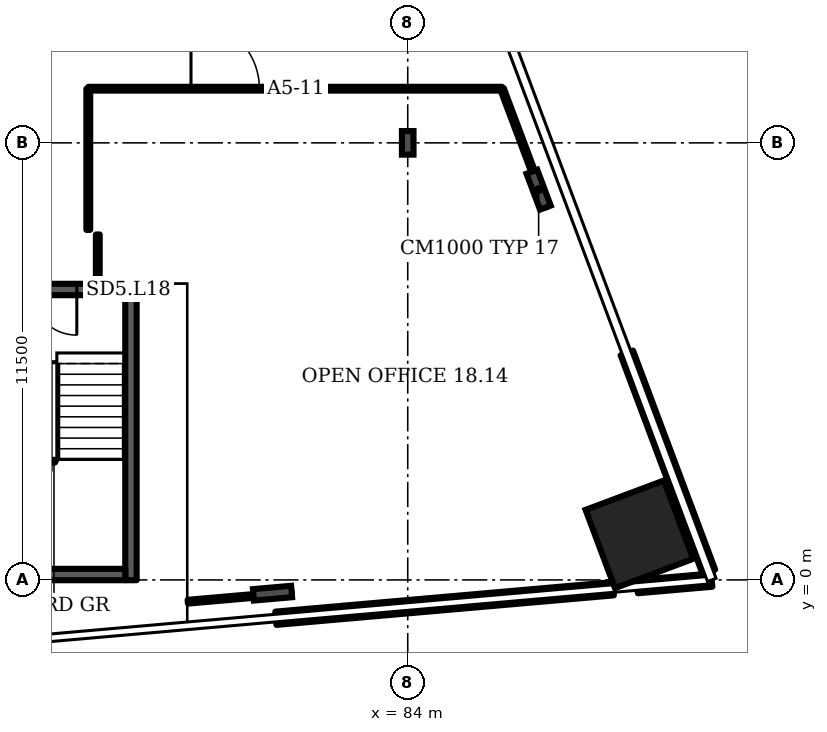
"""IFC4 building model, lengths in metres.
Left out: names, types, materials, properties, quantities, classifications, styles, units other than length and angle.
Written with IfcOpenShell. Run it as: python <this file> out.ifc"""

import sys

from ifc_helpers import new_model, si_unit, direction, frame, frame_2d, origin, origin_2d, place, context, subcontext, project, spatial, rectangle, i_section, extrude, element, fill, save


model = new_model("IFC4")
c1 = context("Model", 3, precision=1e-05, world=origin(), true_north=direction((0.0, 1.0)))
c2 = subcontext(c1, "Body", "Model", "MODEL_VIEW")
j1 = project(units=[si_unit("LENGTHUNIT", "METRE"), si_unit("PLANEANGLEUNIT", "RADIAN")], contexts=[c1])
p1 = place(None, origin())
s1 = spatial("IfcSite", under=j1, at=p1, CompositionType="ELEMENT")
p2 = place(p1, origin())
s2 = spatial("IfcBuilding", under=s1, at=p2, CompositionType="ELEMENT")
p3 = place(p2, frame((0.0, 0.0, 84.7)))
s3 = spatial("IfcBuildingStorey", under=s2, at=p3, CompositionType="ELEMENT", Elevation=84.7)
p4 = place(p3, frame((90.096, 1.2, 0.0), z_axis=(0.0, 0.0, 1.0), x_axis=(-0.351123, 0.936328, 0.0)))
e1 = element("IfcColumn", 1, at=p4, inside=s3, PredefinedType="COLUMN", context=c2, shape_type="SweptSolid", body=[
    extrude(rectangle(XDim=2.2, YDim=2.2, at=origin_2d()), origin(), (0.0, 0.0, 1.0), 3.6),
])
for number, where, z_axis, x_axis in (
    (2, (80.442, -0.349, 0.0), (0.0, 0.0, 1.0), (0.087, -0.996, 0.0)),
    (3, (87.445, 10.268, 0.0), (0.0, 0.0, 1.0), (0.936, 0.351, 0.0)),
):
    element("IfcColumn", number, at=place(p3, frame(where, z_axis=z_axis, x_axis=x_axis)), inside=s3, PredefinedType="COLUMN", context=c2, shape_type="SweptSolid", body=[
        extrude(i_section(OverallWidth=0.302, OverallDepth=1.008, WebThickness=0.021, FlangeThickness=0.04, FilletRadius=0.03, at=origin_2d()), origin(), (0.0, 0.0, 1.0), 3.6),
    ])
p5 = place(p3, frame((84.0, 11.5, 0.0), z_axis=(0.0, 0.0, 1.0), x_axis=(1.0, 0.0, 0.0)))
e4 = element("IfcColumn", 4, at=p5, inside=s3, PredefinedType="COLUMN", context=c2, shape_type="SweptSolid", body=[
    extrude(i_section(OverallWidth=0.305, OverallDepth=0.62, WebThickness=0.021, FlangeThickness=0.04, FilletRadius=0.027, at=origin_2d()), origin(), (0.0, 0.0, 1.0), 3.6),
])
p6 = place(p3, frame((80.53, -1.009, 0.0), z_axis=(0.0, 0.0, 1.0), x_axis=(0.996198, 0.087169, 0.0)))
e5 = element("IfcWall", 5, at=p6, inside=s3, PredefinedType="SOLIDWALL", context=c2, shape_type="SweptSolid", body=[
    extrude(rectangle(XDim=8.912, YDim=0.35, at=frame_2d((4.456, 0.0))), origin(), (0.0, 0.0, 1.0), 1.0),
])
p7 = place(p3, frame((90.039, -0.177, 0.0), z_axis=(0.0, 0.0, 1.0), x_axis=(0.996193, 0.08717, 0.0)))
e6 = element("IfcWall", 6, at=p7, inside=s3, PredefinedType="SOLIDWALL", context=c2, shape_type="SweptSolid", body=[
    extrude(rectangle(XDim=1.969, YDim=0.35, at=frame_2d((0.984, 0.0))), origin(), (0.0, 0.0, 1.0), 1.0),
])
p8 = place(p3, frame((91.926, 0.211, 0.0), z_axis=(0.0, 0.0, 1.0), x_axis=(-0.351118, 0.936328, 0.0)))
e7 = element("IfcWall", 7, at=p8, inside=s3, PredefinedType="SOLIDWALL", context=c2, shape_type="SweptSolid", body=[
    extrude(rectangle(XDim=6.154, YDim=0.35, at=frame_2d((3.077, 0.0))), origin(), (0.0, 0.0, 1.0), 1.0),
])
p9 = place(p3, frame((72.518, 7.642, 0.0), z_axis=(0.0, 0.0, 1.0), x_axis=(1.0, 0.0, 0.0)))
e8 = element("IfcWall", 8, at=p9, inside=s3, PredefinedType="SHEAR", context=c2, shape_type="SweptSolid", body=[
    extrude(rectangle(XDim=4.35, YDim=0.3, at=frame_2d((2.175, 0.0))), origin(), (0.0, 0.0, 1.0), 3.2),
])
p10 = place(p9, frame((1.575, 0.0, 0.0)))
e9 = element("IfcOpeningElement", 9, at=p10, cuts=e8, PredefinedType="OPENING", context=c2, shape_type="SweptSolid", body=[
    extrude(rectangle(XDim=1.2, YDim=2.1, at=frame_2d((0.6, 1.05))), frame((0.0, 0.16, 0.0), z_axis=(0.0, -1.0, 0.0), x_axis=(1.0, 0.0, 0.0)), (0.0, 0.0, 1.0), 0.32),
])
p11 = place(p3, frame((75.595, 9.21, 0.0), z_axis=(0.0, 0.0, 1.0), x_axis=(0.0, 1.0, 0.0)))
e10 = element("IfcWall", 10, at=p11, inside=s3, PredefinedType="PARTITIONING", context=c2, shape_type="SweptSolid", body=[
    extrude(rectangle(XDim=3.715, YDim=0.1, at=frame_2d((1.857, 0.0))), origin(), (0.0, 0.0, 1.0), 3.2),
])
p12 = place(p3, frame((75.595, 12.925, 0.0), z_axis=(0.0, 0.0, 1.0), x_axis=(1.0, 0.0, 0.0)))
e11 = element("IfcWall", 11, at=p12, inside=s3, PredefinedType="PARTITIONING", context=c2, shape_type="SweptSolid", body=[
    extrude(rectangle(XDim=10.885, YDim=0.1, at=frame_2d((5.442, 0.0))), origin(), (0.0, 0.0, 1.0), 3.2),
])
p13 = place(p12, frame((2.702, 0.0, 0.0)))
e12 = element("IfcOpeningElement", 12, at=p13, cuts=e11, PredefinedType="OPENING", context=c2, shape_type="SweptSolid", body=[
    extrude(rectangle(XDim=1.8, YDim=2.1, at=frame_2d((0.9, 1.05))), frame((0.0, 0.06, 0.0), z_axis=(0.0, -1.0, 0.0), x_axis=(1.0, 0.0, 0.0)), (0.0, 0.0, 1.0), 0.12),
])
p14 = place(p3, frame((75.845, 7.812, 0.0), z_axis=(0.0, 0.0, 1.0), x_axis=(0.0, 1.0, 0.0)))
e13 = element("IfcWall", 13, at=p14, inside=s3, PredefinedType="PARTITIONING", context=c2, shape_type="SweptSolid", body=[
    extrude(rectangle(XDim=1.278, YDim=0.1, at=frame_2d((0.639, 0.0))), origin(), (0.0, 0.0, 1.0), 3.2),
])
p15 = place(p3, frame((78.212, -0.573, 0.0), z_axis=(0.0, 0.0, 1.0), x_axis=(0.996224, 0.086779, 0.0)))
e14 = element("IfcWall", 14, at=p15, inside=s3, PredefinedType="PARTITIONING", context=c2, shape_type="SweptSolid", body=[
    extrude(rectangle(XDim=2.743, YDim=0.1, at=frame_2d((1.372, 0.0))), origin(), (0.0, 0.0, 1.0), 2.58),
])
p16 = place(p3, frame((87.65, 9.81, 0.0), z_axis=(0.0, 0.0, 1.0), x_axis=(-0.351597, 0.936149, 0.0)))
e15 = element("IfcWall", 15, at=p16, inside=s3, PredefinedType="PARTITIONING", context=c2, shape_type="SweptSolid", body=[
    extrude(rectangle(XDim=3.327, YDim=0.1, at=frame_2d((1.664, 0.0))), origin(), (0.0, 0.0, 1.0), 2.58),
])
p17 = place(p3, frame((76.718, -0.008, 0.0), z_axis=(0.0, 0.0, 1.0), x_axis=(0.0, 1.0, 0.0)))
e16 = element("IfcWall", 16, at=p17, inside=s3, PredefinedType="SHEAR", context=c2, shape_type="SweptSolid", body=[
    extrude(rectangle(XDim=7.5, YDim=0.3, at=frame_2d((3.75, 0.0))), origin(), (0.0, 0.0, 1.0), 3.2),
])
p18 = place(p3, frame((72.817, 0.142, 0.0), z_axis=(0.0, 0.0, 1.0), x_axis=(1.0, 0.0, 0.0)))
e17 = element("IfcWall", 17, at=p18, inside=s3, PredefinedType="SHEAR", context=c2, shape_type="SweptSolid", body=[
    extrude(rectangle(XDim=3.75, YDim=0.3, at=frame_2d((1.875, 0.0))), origin(), (0.0, 0.0, 1.0), 3.2),
])
p19 = place(p10, origin())
e18 = element("IfcDoor", 18, at=p19, inside=s3, OperationType="SINGLE_SWING_RIGHT", PredefinedType="DOOR", context=c2, shape_type="SweptSolid", body=[
    extrude(rectangle(XDim=1.2, YDim=2.1, at=frame_2d((0.6, 1.05))), frame((0.0, 0.025, 0.0), z_axis=(0.0, -1.0, 0.0), x_axis=(1.0, 0.0, 0.0)), (0.0, 0.0, 1.0), 0.05),
])
fill(e9, e18)
p20 = place(p13, origin())
e19 = element("IfcDoor", 19, at=p20, inside=s3, OperationType="DOUBLE_DOOR_SINGLE_SWING", PredefinedType="DOOR", context=c2, shape_type="SweptSolid", body=[
    extrude(rectangle(XDim=1.8, YDim=2.1, at=frame_2d((0.9, 1.05))), frame((0.0, 0.025, 0.0), z_axis=(0.0, -1.0, 0.0), x_axis=(1.0, 0.0, 0.0)), (0.0, 0.0, 1.0), 0.05),
])
fill(e12, e19)
save(model, sys.argv[1])
